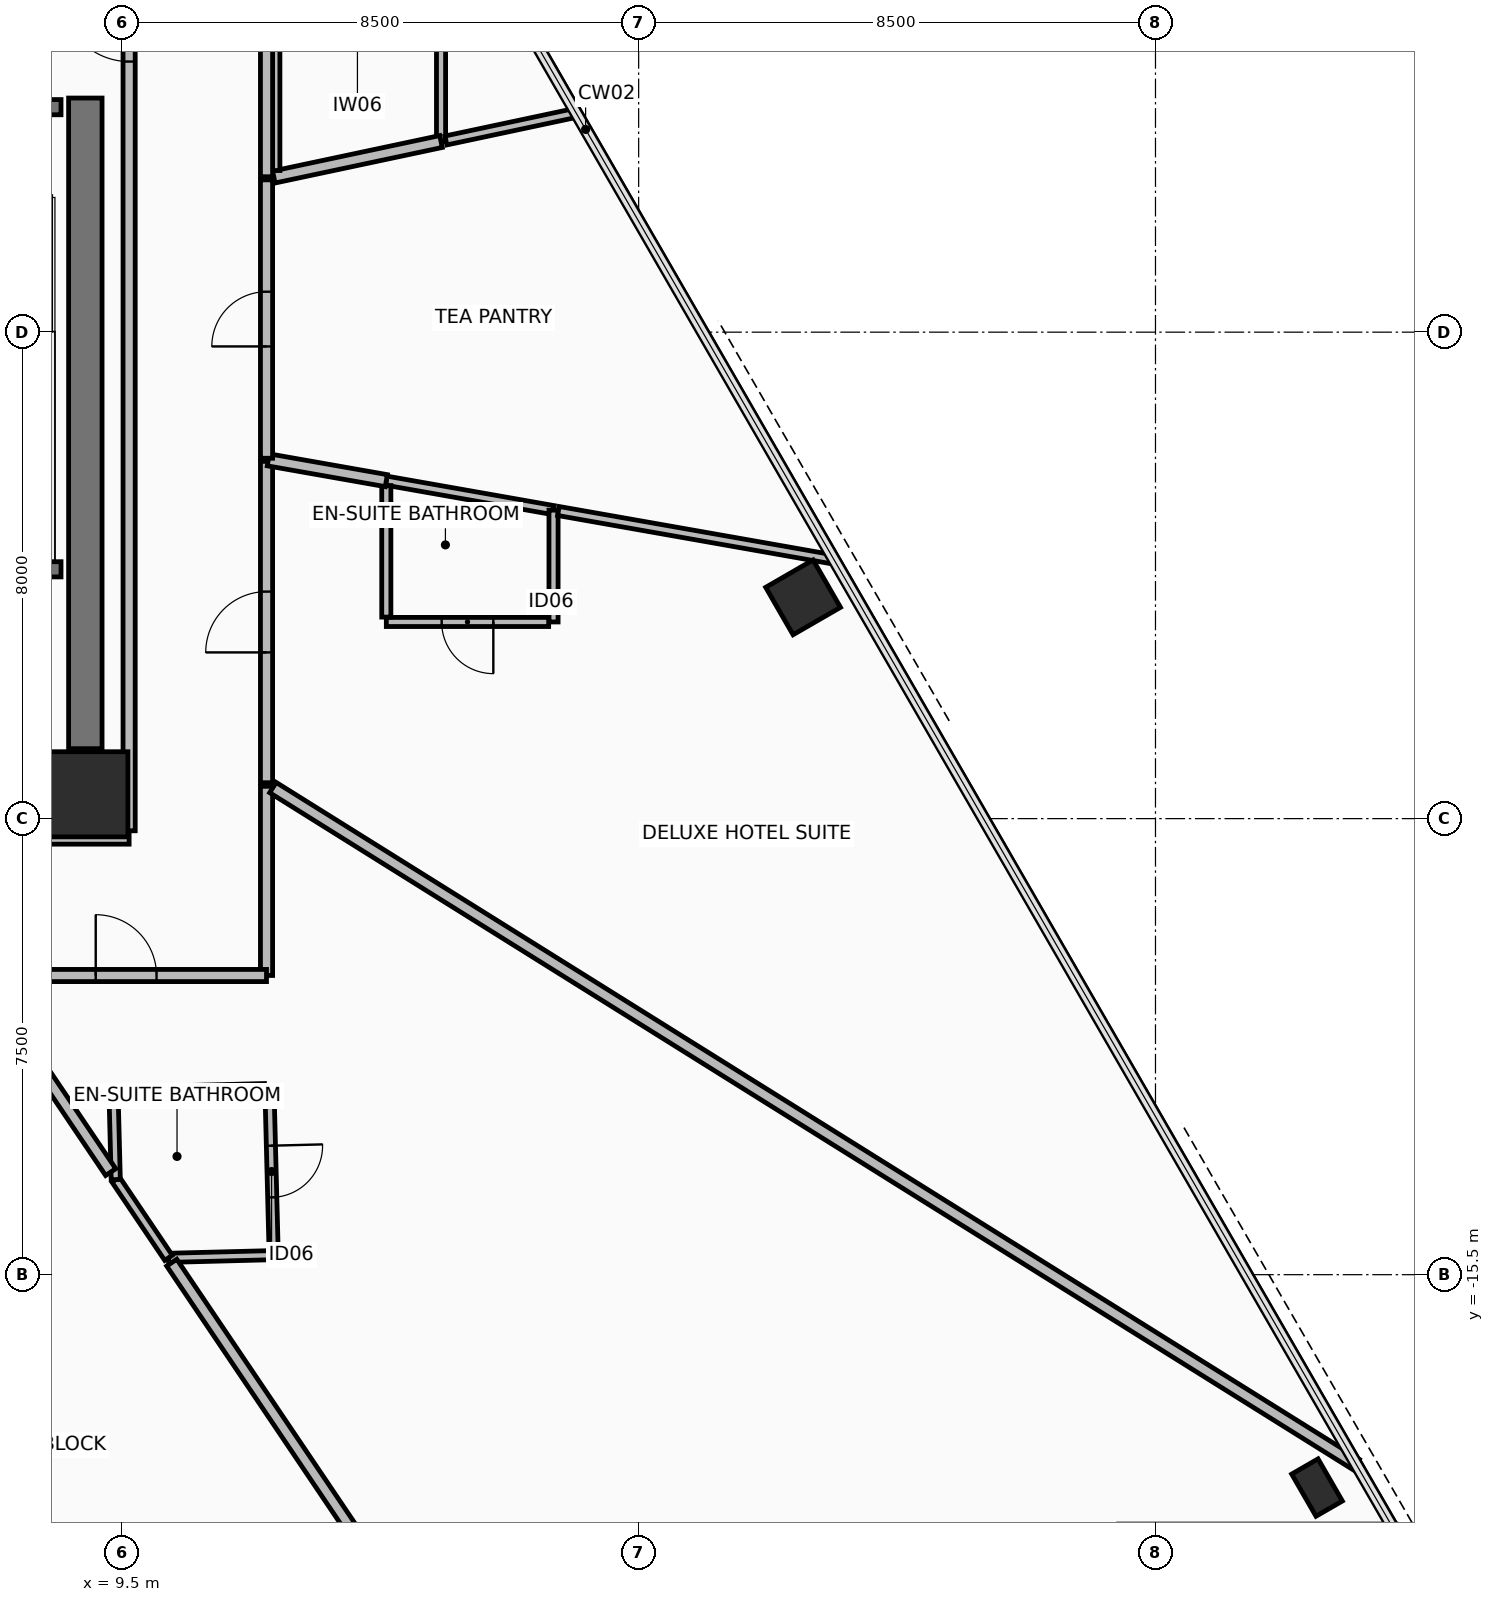
"""IFC4 building model, lengths in metres.
Left out: names, types, materials, properties, quantities, classifications, styles, units other than length and angle.
Written with IfcOpenShell. Run it as: python <this file> out.ifc"""

import sys

from ifc_helpers import new_model, si_unit, direction, frame, frame_2d, origin, origin_2d, place, context, subcontext, project, spatial, rectangle, hollow_rectangle, extrude, element, fill, save


model = new_model("IFC4")
c1 = context("Model", 3, precision=1e-05, world=origin(), true_north=direction((0.0, 1.0)))
c2 = subcontext(c1, "Body", "Model", "MODEL_VIEW")
j1 = project(units=[si_unit("LENGTHUNIT", "METRE"), si_unit("PLANEANGLEUNIT", "RADIAN")], contexts=[c1])
p1 = place(None, origin())
s1 = spatial("IfcSite", under=j1, at=p1, CompositionType="ELEMENT")
p2 = place(p1, origin())
s2 = spatial("IfcBuilding", under=s1, at=p2, CompositionType="ELEMENT")
p3 = place(p2, frame((0.0, 0.0, 35.25)))
s3 = spatial("IfcBuildingStorey", under=s2, at=p3, CompositionType="ELEMENT", Elevation=35.25)
p4 = place(p3, frame((8.9, -7.6, 0.0), z_axis=(0.0, 0.0, 1.0), x_axis=(1.0, 0.0, 0.0)))
e1 = element("IfcColumn", 1, at=p4, inside=s3, PredefinedType="COLUMN", context=c2, shape_type="SweptSolid", body=[
    extrude(rectangle(XDim=1.4, YDim=1.4, at=origin_2d()), origin(), (0.0, 0.0, 1.0), 3.4),
])
p5 = place(p3, frame((29.157, -19.001, 0.0), z_axis=(0.0, 0.0, 1.0), x_axis=(-0.500001511499, 0.866024531118, 0.0)))
e2 = element("IfcColumn", 2, at=p5, inside=s3, PredefinedType="COLUMN", context=c2, shape_type="SweptSolid", body=[
    extrude(hollow_rectangle(XDim=0.5, YDim=0.8, WallThickness=0.04, at=origin_2d()), origin(), (0.0, 0.0, 1.0), 3.4),
])
p6 = place(p3, frame((20.705, -4.361, 0.0), z_axis=(0.0, 0.0, 1.0), x_axis=(-0.500001511499, 0.866024531118, 0.0)))
e3 = element("IfcColumn", 3, at=p6, inside=s3, PredefinedType="COLUMN", context=c2, shape_type="SweptSolid", body=[
    extrude(hollow_rectangle(XDim=0.9, YDim=0.9, WallThickness=0.05, at=origin_2d()), origin(), (0.0, 0.0, 1.0), 3.4),
])
p7 = place(p3, frame((8.9, -6.85, 0.0), z_axis=(0.0, 0.0, 1.0), x_axis=(0.0, 1.0, 0.0)))
e4 = element("IfcWall", 4, at=p7, inside=s3, PredefinedType="SHEAR", context=c2, shape_type="SweptSolid", body=[
    extrude(rectangle(XDim=10.7, YDim=0.55, at=frame_2d((5.35, 0.0))), origin(), (0.0, 0.0, 1.0), 3.225),
])
p8 = place(p3, frame((-9.62, -8.32, 0.0), z_axis=(0.0, 0.0, 1.0), x_axis=(1.0, 0.0, 0.0)))
e5 = element("IfcWall", 5, at=p8, inside=s3, PredefinedType="PARTITIONING", context=c2, shape_type="SweptSolid", body=[
    extrude(rectangle(XDim=19.24, YDim=0.2, at=frame_2d((9.62, 0.0))), origin(), (0.0, 0.0, 1.0), 2.62),
])
p9 = place(p8, frame((15.02, 0.0, 0.0)))
e6 = element("IfcOpeningElement", 6, at=p9, cuts=e5, PredefinedType="OPENING", context=c2, shape_type="SweptSolid", body=[
    extrude(rectangle(XDim=0.9, YDim=2.1, at=frame_2d((0.45, 1.05))), frame((0.0, 0.11, 0.0), z_axis=(0.0, -1.0, 0.0), x_axis=(1.0, 0.0, 0.0)), (0.0, 0.0, 1.0), 0.22),
])
p10 = place(p3, frame((9.62, -8.2, 0.0), z_axis=(0.0, 0.0, 1.0), x_axis=(0.0, 1.0, 0.0)))
e7 = element("IfcWall", 7, at=p10, inside=s3, PredefinedType="PARTITIONING", context=c2, shape_type="SweptSolid", body=[
    extrude(rectangle(XDim=16.4, YDim=0.2, at=frame_2d((8.2, 0.0))), origin(), (0.0, 0.0, 1.0), 2.62),
])
p11 = place(p10, frame((12.65, 0.0, 0.0)))
e8 = element("IfcOpeningElement", 8, at=p11, cuts=e7, PredefinedType="OPENING", context=c2, shape_type="SweptSolid", body=[
    extrude(rectangle(XDim=1.1, YDim=2.15, at=frame_2d((0.55, 1.075))), frame((0.0, 0.11, 0.0), z_axis=(0.0, -1.0, 0.0), x_axis=(1.0, 0.0, 0.0)), (0.0, 0.0, 1.0), 0.22),
])
p12 = place(p3, frame((5.5, 3.7, 0.0), z_axis=(0.0, 0.0, 1.0), x_axis=(1.0, 0.0, 0.0)))
e9 = element("IfcWall", 9, at=p12, inside=s3, PredefinedType="SHEAR", context=c2, shape_type="SweptSolid", body=[
    extrude(rectangle(XDim=3.0, YDim=0.25, at=frame_2d((1.5, 0.0))), origin(), (0.0, 0.0, 1.0), 3.225),
])
p13 = place(p12, frame((0.95, 0.0, 0.0)))
e10 = element("IfcOpeningElement", 10, at=p13, cuts=e9, PredefinedType="OPENING", context=c2, shape_type="SweptSolid", body=[
    extrude(rectangle(XDim=1.1, YDim=2.15, at=frame_2d((0.55, 1.075))), frame((0.0, 0.135, 0.0), z_axis=(0.0, -1.0, 0.0), x_axis=(1.0, 0.0, 0.0)), (0.0, 0.0, 1.0), 0.27),
])
p14 = place(p3, frame((5.5, -3.9, 0.0), z_axis=(0.0, 0.0, 1.0), x_axis=(1.0, 0.0, 0.0)))
e11 = element("IfcWall", 11, at=p14, inside=s3, PredefinedType="SHEAR", context=c2, shape_type="SweptSolid", body=[
    extrude(rectangle(XDim=3.0, YDim=0.25, at=frame_2d((1.5, 0.0))), origin(), (0.0, 0.0, 1.0), 3.225),
])
p15 = place(p3, frame((14.75, 5.096, 0.0), z_axis=(0.0, 0.0, 1.0), x_axis=(0.0, -1.0, 0.0)))
e12 = element("IfcWall", 12, at=p15, inside=s3, PredefinedType="PARTITIONING", context=c2, shape_type="SweptSolid", body=[
    extrude(rectangle(XDim=1.96, YDim=0.15, at=frame_2d((0.98, 0.0))), origin(), (0.0, 0.0, 1.0), 3.225),
])
p16 = place(p3, frame((14.75, 3.135, 0.0), z_axis=(0.0, 0.0, 1.0), x_axis=(-0.978151787969, -0.207891990447, 0.0)))
e13 = element("IfcWall", 13, at=p16, inside=s3, PredefinedType="PARTITIONING", context=c2, shape_type="SweptSolid", body=[
    extrude(rectangle(XDim=2.812, YDim=0.2, at=frame_2d((1.406, 0.0))), origin(), (0.0, 0.0, 1.0), 2.82),
])
p17 = place(p3, frame((12.0, 2.658, 0.0), z_axis=(0.0, 0.0, 1.0), x_axis=(0.0, 1.0, 0.0)))
e14 = element("IfcWall", 14, at=p17, inside=s3, PredefinedType="PARTITIONING", context=c2, shape_type="SweptSolid", body=[
    extrude(rectangle(XDim=2.438, YDim=0.2, at=frame_2d((1.219, 0.0))), origin(), (0.0, 0.0, 1.0), 2.82),
])
p18 = place(p3, frame((11.927, -12.429, 0.0), z_axis=(0.0, 0.0, 1.0), x_axis=(0.025746347005, -0.999668507864, 0.0)))
e15 = element("IfcWall", 15, at=p18, inside=s3, PredefinedType="PARTITIONING", context=c2, shape_type="SweptSolid", body=[
    extrude(rectangle(XDim=2.75, YDim=0.15, at=frame_2d((1.375, 0.0))), origin(), (0.0, 0.0, 1.0), 2.82),
])
p19 = place(p18, frame((0.95, 0.0, 0.0)))
e16 = element("IfcOpeningElement", 16, at=p19, cuts=e15, PredefinedType="OPENING", context=c2, shape_type="SweptSolid", body=[
    extrude(rectangle(XDim=0.85, YDim=2.1, at=frame_2d((0.425, 1.05))), frame((0.0, 0.085, 0.0), z_axis=(0.0, -1.0, 0.0), x_axis=(1.0, 0.0, 0.0)), (0.0, 0.0, 1.0), 0.17),
])
p20 = place(p3, frame((11.998, -15.178, 0.0), z_axis=(0.0, 0.0, 1.0), x_axis=(-0.999670410654, -0.025672359918, 0.0)))
e17 = element("IfcWall", 17, at=p20, inside=s3, PredefinedType="PARTITIONING", context=c2, shape_type="SweptSolid", body=[
    extrude(rectangle(XDim=1.731, YDim=0.15, at=frame_2d((0.865, 0.0))), origin(), (0.0, 0.0, 1.0), 3.225),
])
p21 = place(p3, frame((10.268, -15.223, 0.0), z_axis=(0.0, 0.0, 1.0), x_axis=(-0.559229675695, 0.82901276819, 0.0)))
e18 = element("IfcWall", 18, at=p21, inside=s3, PredefinedType="PARTITIONING", context=c2, shape_type="SweptSolid", body=[
    extrude(rectangle(XDim=1.552, YDim=0.15, at=frame_2d((0.776, 0.0))), origin(), (0.0, 0.0, 1.0), 2.82),
])
p22 = place(p3, frame((9.4, -13.936, 0.0), z_axis=(0.0, 0.0, 1.0), x_axis=(-0.025745445057, 0.999668531094, 0.0)))
e19 = element("IfcWall", 19, at=p22, inside=s3, PredefinedType="PARTITIONING", context=c2, shape_type="SweptSolid", body=[
    extrude(rectangle(XDim=1.441, YDim=0.15, at=frame_2d((0.721, 0.0))), origin(), (0.0, 0.0, 1.0), 3.225),
])
p23 = place(p3, frame((9.443, -12.493, 0.0), z_axis=(0.0, 0.0, 1.0), x_axis=(0.999667618691, 0.025780848324, 0.0)))
e20 = element("IfcWall", 20, at=p23, inside=s3, PredefinedType="PARTITIONING", context=c2, shape_type="SweptSolid", body=[
    extrude(rectangle(XDim=2.405, YDim=0.15, at=frame_2d((1.203, 0.0))), origin(), (0.0, 0.0, 1.0), 3.225),
])
p24 = place(p3, frame((13.85, -2.442, 0.0), z_axis=(0.0, 0.0, 1.0), x_axis=(0.984809952442, -0.173635703618, 0.0)))
e21 = element("IfcWall", 21, at=p24, inside=s3, PredefinedType="PARTITIONING", context=c2, shape_type="SweptSolid", body=[
    extrude(rectangle(XDim=2.792, YDim=0.15, at=frame_2d((1.396, 0.0))), origin(), (0.0, 0.0, 1.0), 2.82),
])
p25 = place(p3, frame((16.6, -2.927, 0.0), z_axis=(0.0, 0.0, 1.0), x_axis=(0.0, -1.0, 0.0)))
e22 = element("IfcWall", 22, at=p25, inside=s3, PredefinedType="PARTITIONING", context=c2, shape_type="SweptSolid", body=[
    extrude(rectangle(XDim=1.839, YDim=0.15, at=frame_2d((0.919, 0.0))), origin(), (0.0, 0.0, 1.0), 3.225),
])
p26 = place(p3, frame((16.52, -4.766, 0.0), z_axis=(0.0, 0.0, 1.0), x_axis=(-1.0, 0.0, 0.0)))
e23 = element("IfcWall", 23, at=p26, inside=s3, PredefinedType="PARTITIONING", context=c2, shape_type="SweptSolid", body=[
    extrude(rectangle(XDim=2.67, YDim=0.15, at=frame_2d((1.335, 0.0))), origin(), (0.0, 0.0, 1.0), 2.82),
])
p27 = place(p26, frame((0.91, 0.0, 0.0)))
e24 = element("IfcOpeningElement", 24, at=p27, cuts=e23, PredefinedType="OPENING", context=c2, shape_type="SweptSolid", body=[
    extrude(rectangle(XDim=0.85, YDim=2.1, at=frame_2d((0.425, 1.05))), frame((0.0, 0.085, 0.0), z_axis=(0.0, -1.0, 0.0), x_axis=(1.0, 0.0, 0.0)), (0.0, 0.0, 1.0), 0.17),
])
p28 = place(p3, frame((13.85, -4.686, 0.0), z_axis=(0.0, 0.0, 1.0), x_axis=(0.0, 1.0, 0.0)))
e25 = element("IfcWall", 25, at=p28, inside=s3, PredefinedType="PARTITIONING", context=c2, shape_type="SweptSolid", body=[
    extrude(rectangle(XDim=2.163, YDim=0.15, at=frame_2d((1.081, 0.0))), origin(), (0.0, 0.0, 1.0), 3.225),
])
p29 = place(p3, frame((7.144, -10.591, 0.0), z_axis=(0.0, 0.0, 1.0), x_axis=(0.559171794076, -0.829051810631, 0.0)))
e26 = element("IfcWall", 26, at=p29, inside=s3, PredefinedType="PARTITIONING", context=c2, shape_type="SweptSolid", body=[
    extrude(rectangle(XDim=3.886, YDim=0.2, at=frame_2d((1.943, 0.0))), origin(), (0.0, 0.0, 1.0), 2.62),
])
p30 = place(p3, frame((10.321, -15.302, 0.0), z_axis=(0.0, 0.0, 1.0), x_axis=(0.559202536063, -0.829031075208, 0.0)))
e27 = element("IfcWall", 27, at=p30, inside=s3, PredefinedType="PARTITIONING", context=c2, shape_type="SweptSolid", body=[
    extrude(rectangle(XDim=10.13, YDim=0.2, at=frame_2d((5.065, 0.0))), origin(), (0.0, 0.0, 1.0), 2.42),
])
p31 = place(p3, frame((16.97, 3.607, 0.0), z_axis=(0.0, 0.0, 1.0), x_axis=(-0.978131050842, -0.207989536706, 0.0)))
e28 = element("IfcWall", 28, at=p31, inside=s3, PredefinedType="PARTITIONING", context=c2, shape_type="SweptSolid", body=[
    extrude(rectangle(XDim=2.188, YDim=0.15, at=frame_2d((1.094, 0.0))), origin(), (0.0, 0.0, 1.0), 2.42),
])
p32 = place(p3, frame((11.88, 2.556, 0.0), z_axis=(0.0, 0.0, 1.0), x_axis=(0.0, 1.0, 0.0)))
e29 = element("IfcWall", 29, at=p32, inside=s3, PredefinedType="PARTITIONING", context=c2, shape_type="SweptSolid", body=[
    extrude(rectangle(XDim=6.063, YDim=0.2, at=frame_2d((3.031, 0.0))), origin(), (0.0, 0.0, 1.0), 2.82),
])
p33 = place(p32, frame((2.811, 0.0, 0.0)))
e30 = element("IfcOpeningElement", 30, at=p33, cuts=e29, PredefinedType="OPENING", context=c2, shape_type="SweptSolid", body=[
    extrude(rectangle(XDim=1.0, YDim=2.15, at=frame_2d((0.5, 1.075))), frame((0.0, 0.11, 0.0), z_axis=(0.0, -1.0, 0.0), x_axis=(1.0, 0.0, 0.0)), (0.0, 0.0, 1.0), 0.22),
])
p34 = place(p3, frame((11.88, -10.579, 0.0), z_axis=(0.0, 0.0, 1.0), x_axis=(0.0, 1.0, 0.0)))
e31 = element("IfcWall", 31, at=p34, inside=s3, PredefinedType="PARTITIONING", context=c2, shape_type="SweptSolid", body=[
    extrude(rectangle(XDim=3.111, YDim=0.2, at=frame_2d((1.555, 0.0))), origin(), (0.0, 0.0, 1.0), 2.62),
])
p35 = place(p3, frame((11.985, -7.489, 0.0), z_axis=(0.0, 0.0, 1.0), x_axis=(0.848049879615, -0.529916410092, 0.0)))
e32 = element("IfcWall", 32, at=p35, inside=s3, PredefinedType="PARTITIONING", context=c2, shape_type="SweptSolid", body=[
    extrude(rectangle(XDim=21.007, YDim=0.2, at=frame_2d((10.504, 0.0))), origin(), (0.0, 0.0, 1.0), 2.42),
])
p36 = place(p3, frame((7.263, -10.58, 0.0), z_axis=(0.0, 0.0, 1.0), x_axis=(1.0, 0.0, 0.0)))
e33 = element("IfcWall", 33, at=p36, inside=s3, PredefinedType="PARTITIONING", context=c2, shape_type="SweptSolid", body=[
    extrude(rectangle(XDim=4.616, YDim=0.2, at=frame_2d((2.308, 0.0))), origin(), (0.0, 0.0, 1.0), 2.62),
])
p37 = place(p36, frame((1.808, 0.0, 0.0)))
e34 = element("IfcOpeningElement", 34, at=p37, cuts=e33, PredefinedType="OPENING", context=c2, shape_type="SweptSolid", body=[
    extrude(rectangle(XDim=1.0, YDim=2.15, at=frame_2d((0.5, 1.075))), frame((0.0, 0.11, 0.0), z_axis=(0.0, -1.0, 0.0), x_axis=(1.0, 0.0, 0.0)), (0.0, 0.0, 1.0), 0.22),
])
p38 = place(p3, frame((11.88, -7.41, 0.0), z_axis=(0.0, 0.0, 1.0), x_axis=(0.0, 1.0, 0.0)))
e35 = element("IfcWall", 35, at=p38, inside=s3, PredefinedType="PARTITIONING", context=c2, shape_type="SweptSolid", body=[
    extrude(rectangle(XDim=5.285, YDim=0.2, at=frame_2d((2.643, 0.0))), origin(), (0.0, 0.0, 1.0), 2.62),
])
p39 = place(p38, frame((2.143, 0.0, 0.0)))
e36 = element("IfcOpeningElement", 36, at=p39, cuts=e35, PredefinedType="OPENING", context=c2, shape_type="SweptSolid", body=[
    extrude(rectangle(XDim=1.0, YDim=2.15, at=frame_2d((0.5, 1.075))), frame((0.0, 0.11, 0.0), z_axis=(0.0, -1.0, 0.0), x_axis=(1.0, 0.0, 0.0)), (0.0, 0.0, 1.0), 0.22),
])
p40 = place(p3, frame((11.909, -2.1, 0.0), z_axis=(0.0, 0.0, 1.0), x_axis=(0.984803505292, -0.173672265965, 0.0)))
e37 = element("IfcWall", 37, at=p40, inside=s3, PredefinedType="PARTITIONING", context=c2, shape_type="SweptSolid", body=[
    extrude(rectangle(XDim=1.971, YDim=0.2, at=frame_2d((0.985, 0.0))), origin(), (0.0, 0.0, 1.0), 3.225),
])
p41 = place(p3, frame((16.68, -2.941, 0.0), z_axis=(0.0, 0.0, 1.0), x_axis=(0.984806573987, -0.173654864121, 0.0)))
e38 = element("IfcWall", 38, at=p41, inside=s3, PredefinedType="PARTITIONING", context=c2, shape_type="SweptSolid", body=[
    extrude(rectangle(XDim=4.59, YDim=0.15, at=frame_2d((2.295, 0.0))), origin(), (0.0, 0.0, 1.0), 2.42),
])
p42 = place(p3, frame((11.88, -2.074, 0.0), z_axis=(0.0, 0.0, 1.0), x_axis=(0.0, 1.0, 0.0)))
e39 = element("IfcWall", 39, at=p42, inside=s3, PredefinedType="PARTITIONING", context=c2, shape_type="SweptSolid", body=[
    extrude(rectangle(XDim=4.579, YDim=0.2, at=frame_2d((2.289, 0.0))), origin(), (0.0, 0.0, 1.0), 3.225),
])
p43 = place(p42, frame((1.839, 0.0, 0.0)))
e40 = element("IfcOpeningElement", 40, at=p43, cuts=e39, PredefinedType="OPENING", context=c2, shape_type="SweptSolid", body=[
    extrude(rectangle(XDim=0.9, YDim=2.1, at=frame_2d((0.45, 1.05))), frame((0.0, 0.11, 0.0), z_axis=(0.0, -1.0, 0.0), x_axis=(1.0, 0.0, 0.0)), (0.0, 0.0, 1.0), 0.22),
])
p44 = place(p11, frame((1.1, 0.0, 0.0), z_axis=(0.0, 0.0, 1.0), x_axis=(-1.0, 0.0, 0.0)))
e41 = element("IfcDoor", 41, at=p44, inside=s3, OperationType="SINGLE_SWING_LEFT", PredefinedType="DOOR", context=c2, shape_type="SweptSolid", body=[
    extrude(rectangle(XDim=1.1, YDim=2.15, at=frame_2d((0.55, 1.075))), frame((0.0, 0.025, 0.0), z_axis=(0.0, -1.0, 0.0), x_axis=(1.0, 0.0, 0.0)), (0.0, 0.0, 1.0), 0.05),
])
fill(e8, e41)
p45 = place(p19, origin())
e42 = element("IfcDoor", 42, at=p45, inside=s3, OperationType="SINGLE_SWING_RIGHT", PredefinedType="DOOR", context=c2, shape_type="SweptSolid", body=[
    extrude(rectangle(XDim=0.85, YDim=2.1, at=frame_2d((0.425, 1.05))), frame((0.0, 0.025, 0.0), z_axis=(0.0, -1.0, 0.0), x_axis=(1.0, 0.0, 0.0)), (0.0, 0.0, 1.0), 0.05),
])
fill(e16, e42)
p46 = place(p27, origin())
e43 = element("IfcDoor", 43, at=p46, inside=s3, OperationType="SINGLE_SWING_RIGHT", PredefinedType="DOOR", context=c2, shape_type="SweptSolid", body=[
    extrude(rectangle(XDim=0.85, YDim=2.1, at=frame_2d((0.425, 1.05))), frame((0.0, 0.025, 0.0), z_axis=(0.0, -1.0, 0.0), x_axis=(1.0, 0.0, 0.0)), (0.0, 0.0, 1.0), 0.05),
])
fill(e24, e43)
p47 = place(p37, origin())
e44 = element("IfcDoor", 44, at=p47, inside=s3, OperationType="SINGLE_SWING_LEFT", PredefinedType="DOOR", context=c2, shape_type="SweptSolid", body=[
    extrude(rectangle(XDim=1.0, YDim=2.15, at=frame_2d((0.5, 1.075))), frame((0.0, 0.025, 0.0), z_axis=(0.0, -1.0, 0.0), x_axis=(1.0, 0.0, 0.0)), (0.0, 0.0, 1.0), 0.05),
])
fill(e34, e44)
p48 = place(p39, origin())
e45 = element("IfcDoor", 45, at=p48, inside=s3, OperationType="SINGLE_SWING_LEFT", PredefinedType="DOOR", context=c2, shape_type="SweptSolid", body=[
    extrude(rectangle(XDim=1.0, YDim=2.15, at=frame_2d((0.5, 1.075))), frame((0.0, 0.025, 0.0), z_axis=(0.0, -1.0, 0.0), x_axis=(1.0, 0.0, 0.0)), (0.0, 0.0, 1.0), 0.05),
])
fill(e36, e45)
p49 = place(p43, origin())
e46 = element("IfcDoor", 46, at=p49, inside=s3, OperationType="SINGLE_SWING_LEFT", PredefinedType="DOOR", context=c2, shape_type="SweptSolid", body=[
    extrude(rectangle(XDim=0.9, YDim=2.1, at=frame_2d((0.45, 1.05))), frame((0.0, 0.025, 0.0), z_axis=(0.0, -1.0, 0.0), x_axis=(1.0, 0.0, 0.0)), (0.0, 0.0, 1.0), 0.05),
])
fill(e40, e46)
save(model, sys.argv[1])
